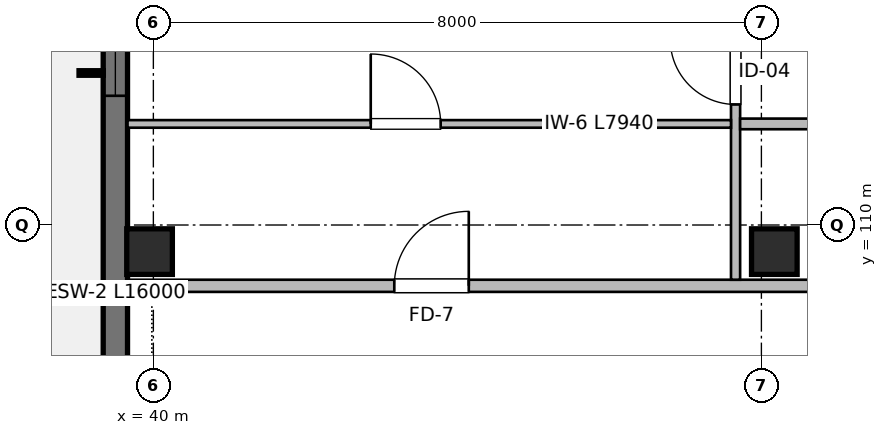
"""IFC4 building model, lengths in metres.
Left out: names, types, materials, properties, quantities, classifications, styles, units other than length and angle.
Written with IfcOpenShell. Run it as: python <this file> out.ifc"""

import sys

from ifc_helpers import new_model, si_unit, direction, frame, frame_2d, origin, origin_2d, place, context, subcontext, project, spatial, rectangle, extrude, element, fill, save


model = new_model("IFC4")
c1 = context("Model", 3, precision=1e-05, world=origin(), true_north=direction((0.0, 1.0)))
c2 = subcontext(c1, "Body", "Model", "MODEL_VIEW")
j1 = project(units=[si_unit("LENGTHUNIT", "METRE"), si_unit("PLANEANGLEUNIT", "RADIAN")], contexts=[c1])
p1 = place(None, origin())
s1 = spatial("IfcSite", under=j1, at=p1, CompositionType="ELEMENT")
p2 = place(p1, origin())
s2 = spatial("IfcBuilding", under=s1, at=p2, CompositionType="ELEMENT")
p3 = place(p2, frame((0.0, 0.0, 20.16)))
s3 = spatial("IfcBuildingStorey", under=s2, at=p3, CompositionType="ELEMENT", Elevation=20.16)
for number, where, z_axis, x_axis in (
    (1, (39.95, 109.65, 0.0), (0.0, 0.0, 1.0), (1.0, 0.0, 0.0)),
    (2, (48.17, 109.65, 0.0), (0.0, 0.0, 1.0), (1.0, 0.0, 0.0)),
):
    element("IfcColumn", number, at=place(p3, frame(where, z_axis=z_axis, x_axis=x_axis)), inside=s3, PredefinedType="COLUMN", context=c2, shape_type="SweptSolid", body=[
        extrude(rectangle(XDim=0.6, YDim=0.6, at=origin_2d()), origin(), (0.0, 0.0, 1.0), 3.2),
    ])
p4 = place(p3, frame((39.5, 100.0, 0.0), z_axis=(0.0, 0.0, 1.0), x_axis=(0.0, 1.0, 0.0)))
e3 = element("IfcWall", 3, at=p4, inside=s3, PredefinedType="SHEAR", context=c2, shape_type="SweptSolid", body=[
    extrude(rectangle(XDim=16.0, YDim=0.32, at=frame_2d((8.0, 0.0))), origin(), (0.0, 0.0, 1.0), 2.98),
])
p5 = place(p4, frame((3.4, 0.0, 0.0)))
e4 = element("IfcOpeningElement", 4, at=p5, cuts=e3, PredefinedType="OPENING", context=c2, shape_type="SweptSolid", body=[
    extrude(rectangle(XDim=1.2, YDim=2.2, at=frame_2d((0.6, 1.1))), frame((0.0, 0.17, 0.0), z_axis=(0.0, -1.0, 0.0), x_axis=(1.0, 0.0, 0.0)), (0.0, 0.0, 1.0), 0.34),
])
p6 = place(p4, frame((4.85, 0.0, 0.77)))
e5 = element("IfcOpeningElement", 5, at=p6, cuts=e3, PredefinedType="OPENING", context=c2, shape_type="SweptSolid", body=[
    extrude(rectangle(XDim=1.65, YDim=1.45, at=frame_2d((0.825, 0.725))), frame((0.0, 0.17, 0.0), z_axis=(0.0, -1.0, 0.0), x_axis=(1.0, 0.0, 0.0)), (0.0, 0.0, 1.0), 0.34),
])
p7 = place(p4, frame((11.7, 0.0, 0.57)))
e6 = element("IfcOpeningElement", 6, at=p7, cuts=e3, PredefinedType="OPENING", context=c2, shape_type="SweptSolid", body=[
    extrude(rectangle(XDim=2.3, YDim=1.65, at=frame_2d((1.15, 0.825))), frame((0.0, 0.17, 0.0), z_axis=(0.0, -1.0, 0.0), x_axis=(1.0, 0.0, 0.0)), (0.0, 0.0, 1.0), 0.34),
])
p8 = place(p3, frame((39.66, 109.2, 0.0), z_axis=(0.0, 0.0, 1.0), x_axis=(1.0, 0.0, 0.0)))
e7 = element("IfcWall", 7, at=p8, inside=s3, PredefinedType="PARTITIONING", context=c2, shape_type="SweptSolid", body=[
    extrude(rectangle(XDim=41.68, YDim=0.16, at=frame_2d((20.84, 0.0))), origin(), (0.0, 0.0, 1.0), 2.935),
])
p9 = place(p8, frame((3.51, 0.0, 0.0)))
e8 = element("IfcOpeningElement", 8, at=p9, cuts=e7, PredefinedType="OPENING", context=c2, shape_type="SweptSolid", body=[
    extrude(rectangle(XDim=0.98, YDim=2.15, at=frame_2d((0.49, 1.075))), frame((0.0, 0.09, 0.0), z_axis=(0.0, -1.0, 0.0), x_axis=(1.0, 0.0, 0.0)), (0.0, 0.0, 1.0), 0.18),
])
p10 = place(p8, frame((17.47, 0.0, 0.0)))
e9 = element("IfcOpeningElement", 9, at=p10, cuts=e7, PredefinedType="OPENING", context=c2, shape_type="SweptSolid", body=[
    extrude(rectangle(XDim=0.98, YDim=2.15, at=frame_2d((0.49, 1.075))), frame((0.0, 0.09, 0.0), z_axis=(0.0, -1.0, 0.0), x_axis=(1.0, 0.0, 0.0)), (0.0, 0.0, 1.0), 0.18),
])
p11 = place(p8, frame((31.39, 0.0, 0.0)))
e10 = element("IfcOpeningElement", 10, at=p11, cuts=e7, PredefinedType="OPENING", context=c2, shape_type="SweptSolid", body=[
    extrude(rectangle(XDim=0.98, YDim=2.15, at=frame_2d((0.49, 1.075))), frame((0.0, 0.09, 0.0), z_axis=(0.0, -1.0, 0.0), x_axis=(1.0, 0.0, 0.0)), (0.0, 0.0, 1.0), 0.18),
])
p12 = place(p3, frame((47.66, 109.28, 0.0), z_axis=(0.0, 0.0, 1.0), x_axis=(0.0, 1.0, 0.0)))
e11 = element("IfcWall", 11, at=p12, inside=s3, PredefinedType="PARTITIONING", context=c2, shape_type="SweptSolid", body=[
    extrude(rectangle(XDim=6.6, YDim=0.12, at=frame_2d((3.3, 0.0))), origin(), (0.0, 0.0, 1.0), 2.935),
])
p13 = place(p12, frame((2.306, 0.0, 0.0)))
e12 = element("IfcOpeningElement", 12, at=p13, cuts=e11, PredefinedType="OPENING", context=c2, shape_type="SweptSolid", body=[
    extrude(rectangle(XDim=0.86, YDim=2.1, at=frame_2d((0.43, 1.05))), frame((0.0, 0.07, 0.0), z_axis=(0.0, -1.0, 0.0), x_axis=(1.0, 0.0, 0.0)), (0.0, 0.0, 1.0), 0.14),
])
p14 = place(p12, frame((4.097, 0.0, 0.0)))
e13 = element("IfcOpeningElement", 13, at=p14, cuts=e11, PredefinedType="OPENING", context=c2, shape_type="SweptSolid", body=[
    extrude(rectangle(XDim=0.9, YDim=2.1, at=frame_2d((0.45, 1.05))), frame((0.0, 0.07, 0.0), z_axis=(0.0, -1.0, 0.0), x_axis=(1.0, 0.0, 0.0)), (0.0, 0.0, 1.0), 0.14),
])
p15 = place(p3, frame((47.72, 111.33, 0.0), z_axis=(0.0, 0.0, 1.0), x_axis=(1.0, 0.0, 0.0)))
e14 = element("IfcWall", 14, at=p15, inside=s3, PredefinedType="PARTITIONING", context=c2, shape_type="SweptSolid", body=[
    extrude(rectangle(XDim=5.74, YDim=0.14, at=frame_2d((2.87, 0.0))), origin(), (0.0, 0.0, 1.0), 2.935),
])
p16 = place(p15, frame((2.32, 0.0, 0.0)))
e15 = element("IfcOpeningElement", 15, at=p16, cuts=e14, PredefinedType="OPENING", context=c2, shape_type="SweptSolid", body=[
    extrude(rectangle(XDim=0.85, YDim=2.05, at=frame_2d((0.425, 1.025))), frame((0.0, 0.08, 0.0), z_axis=(0.0, -1.0, 0.0), x_axis=(1.0, 0.0, 0.0)), (0.0, 0.0, 1.0), 0.16),
])
p17 = place(p3, frame((39.66, 111.33, 0.0), z_axis=(0.0, 0.0, 1.0), x_axis=(1.0, 0.0, 0.0)))
e16 = element("IfcWall", 16, at=p17, inside=s3, PredefinedType="PARTITIONING", context=c2, shape_type="SweptSolid", body=[
    extrude(rectangle(XDim=7.94, YDim=0.1, at=frame_2d((3.97, 0.0))), origin(), (0.0, 0.0, 1.0), 2.935),
])
p18 = place(p17, frame((3.2, 0.0, 0.0)))
e17 = element("IfcOpeningElement", 17, at=p18, cuts=e16, PredefinedType="OPENING", context=c2, shape_type="SweptSolid", body=[
    extrude(rectangle(XDim=0.92, YDim=2.1, at=frame_2d((0.46, 1.05))), frame((0.0, 0.06, 0.0), z_axis=(0.0, -1.0, 0.0), x_axis=(1.0, 0.0, 0.0)), (0.0, 0.0, 1.0), 0.12),
])
p19 = place(p7, origin())
e18 = element("IfcWindow", 18, at=p19, inside=s3, PartitioningType="SINGLE_PANEL", PredefinedType="WINDOW", context=c2, shape_type="SweptSolid", body=[
    extrude(rectangle(XDim=2.3, YDim=1.65, at=frame_2d((1.15, 0.825))), frame((0.0, 0.03, 0.0), z_axis=(0.0, -1.0, 0.0), x_axis=(1.0, 0.0, 0.0)), (0.0, 0.0, 1.0), 0.06),
])
fill(e6, e18)
p20 = place(p9, origin())
e19 = element("IfcDoor", 19, at=p20, inside=s3, OperationType="SINGLE_SWING_RIGHT", PredefinedType="DOOR", context=c2, shape_type="SweptSolid", body=[
    extrude(rectangle(XDim=0.98, YDim=2.15, at=frame_2d((0.49, 1.075))), frame((0.0, 0.025, 0.0), z_axis=(0.0, -1.0, 0.0), x_axis=(1.0, 0.0, 0.0)), (0.0, 0.0, 1.0), 0.05),
])
fill(e8, e19)
p21 = place(p18, origin())
e20 = element("IfcDoor", 20, at=p21, inside=s3, OperationType="SINGLE_SWING_LEFT", PredefinedType="DOOR", context=c2, shape_type="SweptSolid", body=[
    extrude(rectangle(XDim=0.92, YDim=2.1, at=frame_2d((0.46, 1.05))), frame((0.0, 0.025, 0.0), z_axis=(0.0, -1.0, 0.0), x_axis=(1.0, 0.0, 0.0)), (0.0, 0.0, 1.0), 0.05),
])
fill(e17, e20)
p22 = place(p13, origin())
e21 = element("IfcDoor", 21, at=p22, inside=s3, OperationType="SINGLE_SWING_RIGHT", PredefinedType="DOOR", context=c2, shape_type="SweptSolid", body=[
    extrude(rectangle(XDim=0.86, YDim=2.1, at=frame_2d((0.43, 1.05))), frame((0.0, 0.025, 0.0), z_axis=(0.0, -1.0, 0.0), x_axis=(1.0, 0.0, 0.0)), (0.0, 0.0, 1.0), 0.05),
])
fill(e12, e21)
save(model, sys.argv[1])
